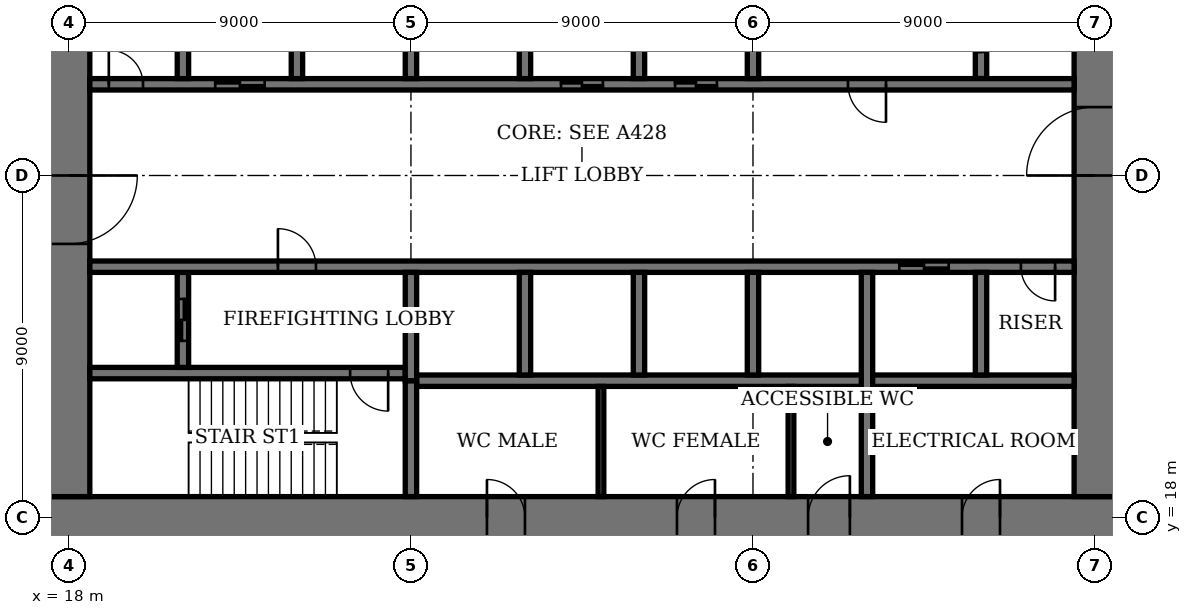
"""IFC4 building model, lengths in metres.
Left out: names, types, materials, properties, quantities, classifications, styles, units other than length and angle.
Written with IfcOpenShell. Run it as: python <this file> out.ifc"""

import sys

from ifc_helpers import new_model, si_unit, direction, frame, frame_2d, origin, place, context, subcontext, project, spatial, rectangle, extrude, element, fill, save


model = new_model("IFC4")
c1 = context("Model", 3, precision=1e-05, world=origin(), true_north=direction((0.0, 1.0)))
c2 = subcontext(c1, "Body", "Model", "MODEL_VIEW")
j1 = project(units=[si_unit("LENGTHUNIT", "METRE"), si_unit("PLANEANGLEUNIT", "RADIAN")], contexts=[c1])
p1 = place(None, origin())
s1 = spatial("IfcSite", under=j1, at=p1, CompositionType="ELEMENT")
p2 = place(p1, origin())
s2 = spatial("IfcBuilding", under=s1, at=p2, CompositionType="ELEMENT")
p3 = place(p2, frame((0.0, 0.0, 109.0)))
s3 = spatial("IfcBuildingStorey", under=s2, at=p3, CompositionType="ELEMENT", Elevation=109.0)
p4 = place(p3, frame((17.45, 18.0, 0.0), z_axis=(0.0, 0.0, 1.0), x_axis=(1.0, 0.0, 0.0)))
e1 = element("IfcWall", 1, at=p4, inside=s3, PredefinedType="SHEAR", context=c2, shape_type="SweptSolid", body=[
    extrude(rectangle(XDim=28.1, YDim=1.1, at=frame_2d((14.05, 0.0))), origin(), (0.0, 0.0, 1.0), 4.0),
])
p5 = place(p4, frame((11.55, 0.0, 0.0)))
e2 = element("IfcOpeningElement", 2, at=p5, cuts=e1, PredefinedType="OPENING", context=c2, shape_type="SweptSolid", body=[
    extrude(rectangle(XDim=1.0, YDim=2.4, at=frame_2d((0.5, 1.2))), frame((0.0, 0.56, 0.0), z_axis=(0.0, -1.0, 0.0), x_axis=(1.0, 0.0, 0.0)), (0.0, 0.0, 1.0), 1.12),
])
p6 = place(p4, frame((16.55, 0.0, 0.0)))
e3 = element("IfcOpeningElement", 3, at=p6, cuts=e1, PredefinedType="OPENING", context=c2, shape_type="SweptSolid", body=[
    extrude(rectangle(XDim=1.0, YDim=2.4, at=frame_2d((0.5, 1.2))), frame((0.0, 0.56, 0.0), z_axis=(0.0, -1.0, 0.0), x_axis=(1.0, 0.0, 0.0)), (0.0, 0.0, 1.0), 1.12),
])
p7 = place(p4, frame((20.0, 0.0, 0.0)))
e4 = element("IfcOpeningElement", 4, at=p7, cuts=e1, PredefinedType="OPENING", context=c2, shape_type="SweptSolid", body=[
    extrude(rectangle(XDim=1.1, YDim=2.4, at=frame_2d((0.55, 1.2))), frame((0.0, 0.56, 0.0), z_axis=(0.0, -1.0, 0.0), x_axis=(1.0, 0.0, 0.0)), (0.0, 0.0, 1.0), 1.12),
])
p8 = place(p4, frame((24.05, 0.0, 0.0)))
e5 = element("IfcOpeningElement", 5, at=p8, cuts=e1, PredefinedType="OPENING", context=c2, shape_type="SweptSolid", body=[
    extrude(rectangle(XDim=1.0, YDim=2.4, at=frame_2d((0.5, 1.2))), frame((0.0, 0.56, 0.0), z_axis=(0.0, -1.0, 0.0), x_axis=(1.0, 0.0, 0.0)), (0.0, 0.0, 1.0), 1.12),
])
p9 = place(p3, frame((18.0, 35.45, 0.0), z_axis=(0.0, 0.0, 1.0), x_axis=(0.0, -1.0, 0.0)))
e6 = element("IfcWall", 6, at=p9, inside=s3, PredefinedType="SHEAR", context=c2, shape_type="SweptSolid", body=[
    extrude(rectangle(XDim=16.9, YDim=1.1, at=frame_2d((8.45, 0.0))), origin(), (0.0, 0.0, 1.0), 4.0),
])
p10 = place(p9, frame((8.45, 0.0, 0.0)))
e7 = element("IfcOpeningElement", 7, at=p10, cuts=e6, PredefinedType="OPENING", context=c2, shape_type="SweptSolid", body=[
    extrude(rectangle(XDim=1.8, YDim=2.4, at=frame_2d((0.9, 1.2))), frame((0.0, 0.56, 0.0), z_axis=(0.0, -1.0, 0.0), x_axis=(1.0, 0.0, 0.0)), (0.0, 0.0, 1.0), 1.12),
])
p11 = place(p3, frame((45.0, 18.55, 0.0), z_axis=(0.0, 0.0, 1.0), x_axis=(0.0, 1.0, 0.0)))
e8 = element("IfcWall", 8, at=p11, inside=s3, PredefinedType="SHEAR", context=c2, shape_type="SweptSolid", body=[
    extrude(rectangle(XDim=16.9, YDim=1.1, at=frame_2d((8.45, 0.0))), origin(), (0.0, 0.0, 1.0), 4.0),
])
p12 = place(p11, frame((8.45, 0.0, 0.0)))
e9 = element("IfcOpeningElement", 9, at=p12, cuts=e8, PredefinedType="OPENING", context=c2, shape_type="SweptSolid", body=[
    extrude(rectangle(XDim=1.8, YDim=2.4, at=frame_2d((0.9, 1.2))), frame((0.0, 0.56, 0.0), z_axis=(0.0, -1.0, 0.0), x_axis=(1.0, 0.0, 0.0)), (0.0, 0.0, 1.0), 1.12),
])
p13 = place(p3, frame((18.55, 21.8, 0.0), z_axis=(0.0, 0.0, 1.0), x_axis=(1.0, 0.0, 0.0)))
e10 = element("IfcWall", 10, at=p13, inside=s3, PredefinedType="SHEAR", context=c2, shape_type="SweptSolid", body=[
    extrude(rectangle(XDim=8.3, YDim=0.3, at=frame_2d((4.15, 0.0))), origin(), (0.0, 0.0, 1.0), 4.0),
])
p14 = place(p13, frame((6.85, 0.0, 0.0)))
e11 = element("IfcOpeningElement", 11, at=p14, cuts=e10, PredefinedType="OPENING", context=c2, shape_type="SweptSolid", body=[
    extrude(rectangle(XDim=1.0, YDim=2.4, at=frame_2d((0.5, 1.2))), frame((0.0, 0.16, 0.0), z_axis=(0.0, -1.0, 0.0), x_axis=(1.0, 0.0, 0.0)), (0.0, 0.0, 1.0), 0.32),
])
p15 = place(p3, frame((27.0, 18.55, 0.0), z_axis=(0.0, 0.0, 1.0), x_axis=(0.0, 1.0, 0.0)))
e12 = element("IfcWall", 12, at=p15, inside=s3, PredefinedType="SHEAR", context=c2, shape_type="SweptSolid", body=[
    extrude(rectangle(XDim=3.05, YDim=0.3, at=frame_2d((1.525, 0.0))), origin(), (0.0, 0.0, 1.0), 4.0),
])
p16 = place(p3, frame((21.0, 21.95, 0.0), z_axis=(0.0, 0.0, 1.0), x_axis=(0.0, 1.0, 0.0)))
e13 = element("IfcWall", 13, at=p16, inside=s3, PredefinedType="SHEAR", context=c2, shape_type="SweptSolid", body=[
    extrude(rectangle(XDim=2.5, YDim=0.3, at=frame_2d((1.25, 0.0))), origin(), (0.0, 0.0, 1.0), 4.0),
])
p17 = place(p16, frame((0.7, 0.0, 0.0)))
e14 = element("IfcOpeningElement", 14, at=p17, cuts=e13, PredefinedType="OPENING", context=c2, shape_type="SweptSolid", body=[
    extrude(rectangle(XDim=1.1, YDim=2.4, at=frame_2d((0.55, 1.2))), frame((0.0, 0.16, 0.0), z_axis=(0.0, -1.0, 0.0), x_axis=(1.0, 0.0, 0.0)), (0.0, 0.0, 1.0), 0.32),
])
p18 = place(p3, frame((42.0, 29.55, 0.0), z_axis=(0.0, 0.0, 1.0), x_axis=(0.0, 1.0, 0.0)))
e15 = element("IfcWall", 15, at=p18, inside=s3, PredefinedType="SHEAR", context=c2, shape_type="SweptSolid", body=[
    extrude(rectangle(XDim=2.5, YDim=0.3, at=frame_2d((1.25, 0.0))), origin(), (0.0, 0.0, 1.0), 4.0),
])
p19 = place(p18, frame((0.7, 0.0, 0.0)))
e16 = element("IfcOpeningElement", 16, at=p19, cuts=e15, PredefinedType="OPENING", context=c2, shape_type="SweptSolid", body=[
    extrude(rectangle(XDim=1.1, YDim=2.4, at=frame_2d((0.55, 1.2))), frame((0.0, 0.16, 0.0), z_axis=(0.0, -1.0, 0.0), x_axis=(1.0, 0.0, 0.0)), (0.0, 0.0, 1.0), 0.32),
])
p20 = place(p3, frame((18.55, 24.6, 0.0), z_axis=(0.0, 0.0, 1.0), x_axis=(1.0, 0.0, 0.0)))
e17 = element("IfcWall", 17, at=p20, inside=s3, PredefinedType="SHEAR", context=c2, shape_type="SweptSolid", body=[
    extrude(rectangle(XDim=25.9, YDim=0.3, at=frame_2d((12.95, 0.0))), origin(), (0.0, 0.0, 1.0), 4.0),
])
p21 = place(p20, frame((4.95, 0.0, 0.0)))
e18 = element("IfcOpeningElement", 18, at=p21, cuts=e17, PredefinedType="OPENING", context=c2, shape_type="SweptSolid", body=[
    extrude(rectangle(XDim=1.0, YDim=2.4, at=frame_2d((0.5, 1.2))), frame((0.0, 0.16, 0.0), z_axis=(0.0, -1.0, 0.0), x_axis=(1.0, 0.0, 0.0)), (0.0, 0.0, 1.0), 0.32),
])
p22 = place(p20, frame((24.5, 0.0, 0.0)))
e19 = element("IfcOpeningElement", 19, at=p22, cuts=e17, PredefinedType="OPENING", context=c2, shape_type="SweptSolid", body=[
    extrude(rectangle(XDim=0.9, YDim=2.1, at=frame_2d((0.45, 1.05))), frame((0.0, 0.16, 0.0), z_axis=(0.0, -1.0, 0.0), x_axis=(1.0, 0.0, 0.0)), (0.0, 0.0, 1.0), 0.32),
])
p23 = place(p20, frame((21.3, 0.0, 0.0)))
e20 = element("IfcOpeningElement", 20, at=p23, cuts=e17, PredefinedType="OPENING", context=c2, shape_type="SweptSolid", body=[
    extrude(rectangle(XDim=1.3, YDim=2.4, at=frame_2d((0.65, 1.2))), frame((0.0, 0.16, 0.0), z_axis=(0.0, -1.0, 0.0), x_axis=(1.0, 0.0, 0.0)), (0.0, 0.0, 1.0), 0.32),
])
p24 = place(p3, frame((18.55, 29.4, 0.0), z_axis=(0.0, 0.0, 1.0), x_axis=(1.0, 0.0, 0.0)))
e21 = element("IfcWall", 21, at=p24, inside=s3, PredefinedType="SHEAR", context=c2, shape_type="SweptSolid", body=[
    extrude(rectangle(XDim=25.9, YDim=0.3, at=frame_2d((12.95, 0.0))), origin(), (0.0, 0.0, 1.0), 4.0),
])
p25 = place(p24, frame((19.95, 0.0, 0.0)))
e22 = element("IfcOpeningElement", 22, at=p25, cuts=e21, PredefinedType="OPENING", context=c2, shape_type="SweptSolid", body=[
    extrude(rectangle(XDim=1.0, YDim=2.4, at=frame_2d((0.5, 1.2))), frame((0.0, 0.16, 0.0), z_axis=(0.0, -1.0, 0.0), x_axis=(1.0, 0.0, 0.0)), (0.0, 0.0, 1.0), 0.32),
])
p26 = place(p24, frame((0.5, 0.0, 0.0)))
e23 = element("IfcOpeningElement", 23, at=p26, cuts=e21, PredefinedType="OPENING", context=c2, shape_type="SweptSolid", body=[
    extrude(rectangle(XDim=0.9, YDim=2.1, at=frame_2d((0.45, 1.05))), frame((0.0, 0.16, 0.0), z_axis=(0.0, -1.0, 0.0), x_axis=(1.0, 0.0, 0.0)), (0.0, 0.0, 1.0), 0.32),
])
p27 = place(p24, frame((15.4, 0.0, 0.0)))
e24 = element("IfcOpeningElement", 24, at=p27, cuts=e21, PredefinedType="OPENING", context=c2, shape_type="SweptSolid", body=[
    extrude(rectangle(XDim=1.1, YDim=2.4, at=frame_2d((0.55, 1.2))), frame((0.0, 0.16, 0.0), z_axis=(0.0, -1.0, 0.0), x_axis=(1.0, 0.0, 0.0)), (0.0, 0.0, 1.0), 0.32),
])
p28 = place(p24, frame((12.4, 0.0, 0.0)))
e25 = element("IfcOpeningElement", 25, at=p28, cuts=e21, PredefinedType="OPENING", context=c2, shape_type="SweptSolid", body=[
    extrude(rectangle(XDim=1.1, YDim=2.4, at=frame_2d((0.55, 1.2))), frame((0.0, 0.16, 0.0), z_axis=(0.0, -1.0, 0.0), x_axis=(1.0, 0.0, 0.0)), (0.0, 0.0, 1.0), 0.32),
])
p29 = place(p24, frame((3.3, 0.0, 0.0)))
e26 = element("IfcOpeningElement", 26, at=p29, cuts=e21, PredefinedType="OPENING", context=c2, shape_type="SweptSolid", body=[
    extrude(rectangle(XDim=1.3, YDim=2.4, at=frame_2d((0.65, 1.2))), frame((0.0, 0.16, 0.0), z_axis=(0.0, -1.0, 0.0), x_axis=(1.0, 0.0, 0.0)), (0.0, 0.0, 1.0), 0.32),
])
p30 = place(p3, frame((27.15, 21.6, 0.0), z_axis=(0.0, 0.0, 1.0), x_axis=(1.0, 0.0, 0.0)))
e27 = element("IfcWall", 27, at=p30, inside=s3, PredefinedType="SHEAR", context=c2, shape_type="SweptSolid", body=[
    extrude(rectangle(XDim=17.3, YDim=0.3, at=frame_2d((8.65, 0.0))), origin(), (0.0, 0.0, 1.0), 4.0),
])
for number, where, z_axis, x_axis in (
    (28, (30.0, 21.75, 0.0), (0.0, 0.0, 1.0), (0.0, 1.0, 0.0)),
    (29, (33.0, 29.55, 0.0), (0.0, 0.0, 1.0), (0.0, 1.0, 0.0)),
    (30, (33.0, 21.75, 0.0), (0.0, 0.0, 1.0), (0.0, 1.0, 0.0)),
    (31, (30.0, 29.55, 0.0), (0.0, 0.0, 1.0), (0.0, 1.0, 0.0)),
    (32, (36.0, 21.75, 0.0), (0.0, 0.0, 1.0), (0.0, 1.0, 0.0)),
    (33, (27.0, 29.55, 0.0), (0.0, 0.0, 1.0), (0.0, 1.0, 0.0)),
):
    element("IfcWall", number, at=place(p3, frame(where, z_axis=z_axis, x_axis=x_axis)), inside=s3, PredefinedType="SHEAR", context=c2, shape_type="SweptSolid", body=[
        extrude(rectangle(XDim=2.7, YDim=0.3, at=frame_2d((1.35, 0.0))), origin(), (0.0, 0.0, 1.0), 4.0),
    ])
for number, where, z_axis, x_axis in (
    (34, (39.0, 18.55, 0.0), (0.0, 0.0, 1.0), (0.0, 1.0, 0.0)),
    (35, (24.0, 29.55, 0.0), (0.0, 0.0, 1.0), (0.0, 1.0, 0.0)),
):
    element("IfcWall", number, at=place(p3, frame(where, z_axis=z_axis, x_axis=x_axis)), inside=s3, PredefinedType="SHEAR", context=c2, shape_type="SweptSolid", body=[
        extrude(rectangle(XDim=5.9, YDim=0.3, at=frame_2d((2.95, 0.0))), origin(), (0.0, 0.0, 1.0), 4.0),
    ])
for number, where, z_axis, x_axis in (
    (36, (42.0, 21.75, 0.0), (0.0, 0.0, 1.0), (0.0, 1.0, 0.0)),
    (37, (21.0, 29.55, 0.0), (0.0, 0.0, 1.0), (0.0, 1.0, 0.0)),
):
    element("IfcWall", number, at=place(p3, frame(where, z_axis=z_axis, x_axis=x_axis)), inside=s3, PredefinedType="SHEAR", context=c2, shape_type="SweptSolid", body=[
        extrude(rectangle(XDim=2.7, YDim=0.3, at=frame_2d((1.35, 0.0))), origin(), (0.0, 0.0, 1.0), 4.0),
    ])
for number, where, z_axis, x_axis in (
    (38, (27.0, 21.6, 0.0), (0.0, 0.0, 1.0), (0.0, 1.0, 0.0)),
    (39, (36.0, 29.55, 0.0), (0.0, 0.0, 1.0), (0.0, 1.0, 0.0)),
):
    element("IfcWall", number, at=place(p3, frame(where, z_axis=z_axis, x_axis=x_axis)), inside=s3, PredefinedType="SHEAR", context=c2, shape_type="SweptSolid", body=[
        extrude(rectangle(XDim=2.85, YDim=0.3, at=frame_2d((1.425, 0.0))), origin(), (0.0, 0.0, 1.0), 4.0),
    ])
for number, where, z_axis, x_axis in (
    (40, (32.0, 18.55, 0.0), (0.0, 0.0, 1.0), (0.0, 1.0, 0.0)),
    (41, (37.0, 18.55, 0.0), (0.0, 0.0, 1.0), (0.0, 1.0, 0.0)),
):
    element("IfcWall", number, at=place(p3, frame(where, z_axis=z_axis, x_axis=x_axis)), inside=s3, PredefinedType="PARTITIONING", context=c2, shape_type="SweptSolid", body=[
        extrude(rectangle(XDim=2.9, YDim=0.15, at=frame_2d((1.45, 0.0))), origin(), (0.0, 0.0, 1.0), 3.75),
    ])
p31 = place(p10, origin())
e42 = element("IfcDoor", 42, at=p31, inside=s3, OperationType="DOUBLE_DOOR_DOUBLE_SWING", PredefinedType="DOOR", context=c2, shape_type="SweptSolid", body=[
    extrude(rectangle(XDim=1.8, YDim=2.4, at=frame_2d((0.9, 1.2))), frame((0.0, 0.03, 0.0), z_axis=(0.0, -1.0, 0.0), x_axis=(1.0, 0.0, 0.0)), (0.0, 0.0, 1.0), 0.06),
    extrude(rectangle(XDim=0.04, YDim=2.4, at=frame_2d((0.02, 1.2))), frame((0.0, 0.55, 0.0), z_axis=(0.0, -1.0, 0.0), x_axis=(1.0, 0.0, 0.0)), (0.0, 0.0, 1.0), 1.1),
    extrude(rectangle(XDim=0.04, YDim=2.4, at=frame_2d((1.78, 1.2))), frame((0.0, 0.55, 0.0), z_axis=(0.0, -1.0, 0.0), x_axis=(1.0, 0.0, 0.0)), (0.0, 0.0, 1.0), 1.1),
    extrude(rectangle(XDim=1.8, YDim=0.04, at=frame_2d((0.9, 2.38))), frame((0.0, 0.55, 0.0), z_axis=(0.0, -1.0, 0.0), x_axis=(1.0, 0.0, 0.0)), (0.0, 0.0, 1.0), 1.1),
])
fill(e7, e42)
p32 = place(p12, origin())
e43 = element("IfcDoor", 43, at=p32, inside=s3, OperationType="DOUBLE_DOOR_DOUBLE_SWING", PredefinedType="DOOR", context=c2, shape_type="SweptSolid", body=[
    extrude(rectangle(XDim=1.8, YDim=2.4, at=frame_2d((0.9, 1.2))), frame((0.0, 0.03, 0.0), z_axis=(0.0, -1.0, 0.0), x_axis=(1.0, 0.0, 0.0)), (0.0, 0.0, 1.0), 0.06),
    extrude(rectangle(XDim=0.04, YDim=2.4, at=frame_2d((0.02, 1.2))), frame((0.0, 0.55, 0.0), z_axis=(0.0, -1.0, 0.0), x_axis=(1.0, 0.0, 0.0)), (0.0, 0.0, 1.0), 1.1),
    extrude(rectangle(XDim=0.04, YDim=2.4, at=frame_2d((1.78, 1.2))), frame((0.0, 0.55, 0.0), z_axis=(0.0, -1.0, 0.0), x_axis=(1.0, 0.0, 0.0)), (0.0, 0.0, 1.0), 1.1),
    extrude(rectangle(XDim=1.8, YDim=0.04, at=frame_2d((0.9, 2.38))), frame((0.0, 0.55, 0.0), z_axis=(0.0, -1.0, 0.0), x_axis=(1.0, 0.0, 0.0)), (0.0, 0.0, 1.0), 1.1),
])
fill(e9, e43)
p33 = place(p5, origin())
e44 = element("IfcDoor", 44, at=p33, inside=s3, OperationType="SINGLE_SWING_RIGHT", PredefinedType="DOOR", context=c2, shape_type="SweptSolid", body=[
    extrude(rectangle(XDim=1.0, YDim=2.4, at=frame_2d((0.5, 1.2))), frame((0.0, 0.025, 0.0), z_axis=(0.0, -1.0, 0.0), x_axis=(1.0, 0.0, 0.0)), (0.0, 0.0, 1.0), 0.05),
    extrude(rectangle(XDim=0.04, YDim=2.4, at=frame_2d((0.02, 1.2))), frame((0.0, 0.4, 0.0), z_axis=(0.0, -1.0, 0.0), x_axis=(1.0, 0.0, 0.0)), (0.0, 0.0, 1.0), 0.8),
    extrude(rectangle(XDim=0.04, YDim=2.4, at=frame_2d((0.98, 1.2))), frame((0.0, 0.4, 0.0), z_axis=(0.0, -1.0, 0.0), x_axis=(1.0, 0.0, 0.0)), (0.0, 0.0, 1.0), 0.8),
    extrude(rectangle(XDim=1.0, YDim=0.04, at=frame_2d((0.5, 2.38))), frame((0.0, 0.4, 0.0), z_axis=(0.0, -1.0, 0.0), x_axis=(1.0, 0.0, 0.0)), (0.0, 0.0, 1.0), 0.8),
])
fill(e2, e44)
p34 = place(p6, origin())
e45 = element("IfcDoor", 45, at=p34, inside=s3, OperationType="SINGLE_SWING_LEFT", PredefinedType="DOOR", context=c2, shape_type="SweptSolid", body=[
    extrude(rectangle(XDim=1.0, YDim=2.4, at=frame_2d((0.5, 1.2))), frame((0.0, 0.025, 0.0), z_axis=(0.0, -1.0, 0.0), x_axis=(1.0, 0.0, 0.0)), (0.0, 0.0, 1.0), 0.05),
    extrude(rectangle(XDim=0.04, YDim=2.4, at=frame_2d((0.02, 1.2))), frame((0.0, 0.4, 0.0), z_axis=(0.0, -1.0, 0.0), x_axis=(1.0, 0.0, 0.0)), (0.0, 0.0, 1.0), 0.8),
    extrude(rectangle(XDim=0.04, YDim=2.4, at=frame_2d((0.98, 1.2))), frame((0.0, 0.4, 0.0), z_axis=(0.0, -1.0, 0.0), x_axis=(1.0, 0.0, 0.0)), (0.0, 0.0, 1.0), 0.8),
    extrude(rectangle(XDim=1.0, YDim=0.04, at=frame_2d((0.5, 2.38))), frame((0.0, 0.4, 0.0), z_axis=(0.0, -1.0, 0.0), x_axis=(1.0, 0.0, 0.0)), (0.0, 0.0, 1.0), 0.8),
])
fill(e3, e45)
p35 = place(p7, origin())
e46 = element("IfcDoor", 46, at=p35, inside=s3, OperationType="SINGLE_SWING_LEFT", PredefinedType="DOOR", context=c2, shape_type="SweptSolid", body=[
    extrude(rectangle(XDim=1.1, YDim=2.4, at=frame_2d((0.55, 1.2))), frame((0.0, 0.025, 0.0), z_axis=(0.0, -1.0, 0.0), x_axis=(1.0, 0.0, 0.0)), (0.0, 0.0, 1.0), 0.05),
    extrude(rectangle(XDim=0.04, YDim=2.4, at=frame_2d((0.02, 1.2))), frame((0.0, 0.44, 0.0), z_axis=(0.0, -1.0, 0.0), x_axis=(1.0, 0.0, 0.0)), (0.0, 0.0, 1.0), 0.88),
    extrude(rectangle(XDim=0.04, YDim=2.4, at=frame_2d((1.08, 1.2))), frame((0.0, 0.44, 0.0), z_axis=(0.0, -1.0, 0.0), x_axis=(1.0, 0.0, 0.0)), (0.0, 0.0, 1.0), 0.88),
    extrude(rectangle(XDim=1.1, YDim=0.04, at=frame_2d((0.55, 2.38))), frame((0.0, 0.44, 0.0), z_axis=(0.0, -1.0, 0.0), x_axis=(1.0, 0.0, 0.0)), (0.0, 0.0, 1.0), 0.88),
])
fill(e4, e46)
p36 = place(p8, origin())
e47 = element("IfcDoor", 47, at=p36, inside=s3, OperationType="SINGLE_SWING_LEFT", PredefinedType="DOOR", context=c2, shape_type="SweptSolid", body=[
    extrude(rectangle(XDim=1.0, YDim=2.4, at=frame_2d((0.5, 1.2))), frame((0.0, 0.025, 0.0), z_axis=(0.0, -1.0, 0.0), x_axis=(1.0, 0.0, 0.0)), (0.0, 0.0, 1.0), 0.05),
    extrude(rectangle(XDim=0.04, YDim=2.4, at=frame_2d((0.02, 1.2))), frame((0.0, 0.4, 0.0), z_axis=(0.0, -1.0, 0.0), x_axis=(1.0, 0.0, 0.0)), (0.0, 0.0, 1.0), 0.8),
    extrude(rectangle(XDim=0.04, YDim=2.4, at=frame_2d((0.98, 1.2))), frame((0.0, 0.4, 0.0), z_axis=(0.0, -1.0, 0.0), x_axis=(1.0, 0.0, 0.0)), (0.0, 0.0, 1.0), 0.8),
    extrude(rectangle(XDim=1.0, YDim=0.04, at=frame_2d((0.5, 2.38))), frame((0.0, 0.4, 0.0), z_axis=(0.0, -1.0, 0.0), x_axis=(1.0, 0.0, 0.0)), (0.0, 0.0, 1.0), 0.8),
])
fill(e5, e47)
p37 = place(p14, origin())
e48 = element("IfcDoor", 48, at=p37, inside=s3, OperationType="SINGLE_SWING_RIGHT", PredefinedType="DOOR", context=c2, shape_type="SweptSolid", body=[
    extrude(rectangle(XDim=1.0, YDim=2.4, at=frame_2d((0.5, 1.2))), frame((0.0, 0.03, 0.0), z_axis=(0.0, -1.0, 0.0), x_axis=(1.0, 0.0, 0.0)), (0.0, 0.0, 1.0), 0.06),
])
fill(e11, e48)
p38 = place(p21, origin())
e49 = element("IfcDoor", 49, at=p38, inside=s3, OperationType="SINGLE_SWING_RIGHT", PredefinedType="DOOR", context=c2, shape_type="SweptSolid", body=[
    extrude(rectangle(XDim=1.0, YDim=2.4, at=frame_2d((0.5, 1.2))), frame((0.0, 0.03, 0.0), z_axis=(0.0, -1.0, 0.0), x_axis=(1.0, 0.0, 0.0)), (0.0, 0.0, 1.0), 0.06),
])
fill(e18, e49)
p39 = place(p25, origin())
e50 = element("IfcDoor", 50, at=p39, inside=s3, OperationType="SINGLE_SWING_RIGHT", PredefinedType="DOOR", context=c2, shape_type="SweptSolid", body=[
    extrude(rectangle(XDim=1.0, YDim=2.4, at=frame_2d((0.5, 1.2))), frame((0.0, 0.03, 0.0), z_axis=(0.0, -1.0, 0.0), x_axis=(1.0, 0.0, 0.0)), (0.0, 0.0, 1.0), 0.06),
])
fill(e22, e50)
p40 = place(p22, origin())
e51 = element("IfcDoor", 51, at=p40, inside=s3, OperationType="SINGLE_SWING_RIGHT", PredefinedType="DOOR", context=c2, shape_type="SweptSolid", body=[
    extrude(rectangle(XDim=0.9, YDim=2.1, at=frame_2d((0.45, 1.05))), frame((0.0, 0.03, 0.0), z_axis=(0.0, -1.0, 0.0), x_axis=(1.0, 0.0, 0.0)), (0.0, 0.0, 1.0), 0.06),
])
fill(e19, e51)
p41 = place(p26, origin())
e52 = element("IfcDoor", 52, at=p41, inside=s3, OperationType="SINGLE_SWING_RIGHT", PredefinedType="DOOR", context=c2, shape_type="SweptSolid", body=[
    extrude(rectangle(XDim=0.9, YDim=2.1, at=frame_2d((0.45, 1.05))), frame((0.0, 0.03, 0.0), z_axis=(0.0, -1.0, 0.0), x_axis=(1.0, 0.0, 0.0)), (0.0, 0.0, 1.0), 0.06),
])
fill(e23, e52)
p42 = place(p27, origin())
e53 = element("IfcDoor", 53, at=p42, inside=s3, OperationType="DOUBLE_DOOR_SLIDING", PredefinedType="DOOR", context=c2, shape_type="SweptSolid", body=[
    extrude(rectangle(XDim=1.1, YDim=2.4, at=frame_2d((0.55, 1.2))), frame((0.0, 0.02, 0.0), z_axis=(0.0, -1.0, 0.0), x_axis=(1.0, 0.0, 0.0)), (0.0, 0.0, 1.0), 0.04),
])
fill(e24, e53)
p43 = place(p28, origin())
e54 = element("IfcDoor", 54, at=p43, inside=s3, OperationType="DOUBLE_DOOR_SLIDING", PredefinedType="DOOR", context=c2, shape_type="SweptSolid", body=[
    extrude(rectangle(XDim=1.1, YDim=2.4, at=frame_2d((0.55, 1.2))), frame((0.0, 0.02, 0.0), z_axis=(0.0, -1.0, 0.0), x_axis=(1.0, 0.0, 0.0)), (0.0, 0.0, 1.0), 0.04),
])
fill(e25, e54)
p44 = place(p23, origin())
e55 = element("IfcDoor", 55, at=p44, inside=s3, OperationType="DOUBLE_DOOR_SLIDING", PredefinedType="DOOR", context=c2, shape_type="SweptSolid", body=[
    extrude(rectangle(XDim=1.3, YDim=2.4, at=frame_2d((0.65, 1.2))), frame((0.0, 0.02, 0.0), z_axis=(0.0, -1.0, 0.0), x_axis=(1.0, 0.0, 0.0)), (0.0, 0.0, 1.0), 0.04),
])
fill(e20, e55)
p45 = place(p29, origin())
e56 = element("IfcDoor", 56, at=p45, inside=s3, OperationType="DOUBLE_DOOR_SLIDING", PredefinedType="DOOR", context=c2, shape_type="SweptSolid", body=[
    extrude(rectangle(XDim=1.3, YDim=2.4, at=frame_2d((0.65, 1.2))), frame((0.0, 0.02, 0.0), z_axis=(0.0, -1.0, 0.0), x_axis=(1.0, 0.0, 0.0)), (0.0, 0.0, 1.0), 0.04),
])
fill(e26, e56)
p46 = place(p17, origin())
e57 = element("IfcDoor", 57, at=p46, inside=s3, OperationType="DOUBLE_DOOR_SLIDING", PredefinedType="DOOR", context=c2, shape_type="SweptSolid", body=[
    extrude(rectangle(XDim=1.1, YDim=2.4, at=frame_2d((0.55, 1.2))), frame((0.0, 0.03, 0.0), z_axis=(0.0, -1.0, 0.0), x_axis=(1.0, 0.0, 0.0)), (0.0, 0.0, 1.0), 0.06),
])
fill(e14, e57)
save(model, sys.argv[1])
